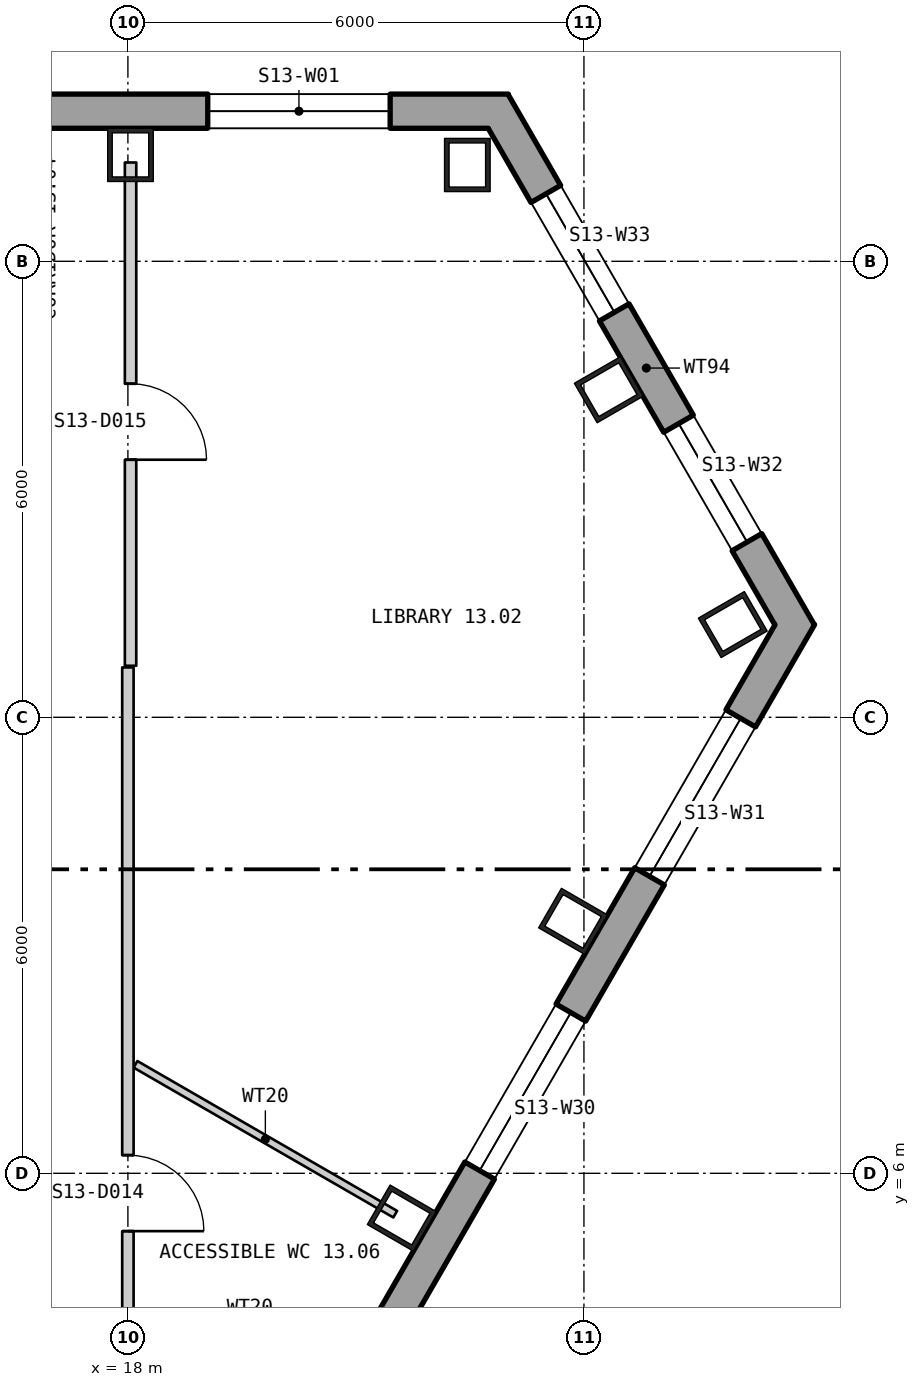
"""IFC4 building model, lengths in metres.
Left out: names, types, materials, properties, quantities, classifications, styles, units other than length and angle.
Written with IfcOpenShell. Run it as: python <this file> out.ifc"""

import sys

from ifc_helpers import new_model, si_unit, direction, frame, frame_2d, origin, origin_2d, place, context, subcontext, project, spatial, polyline, rectangle, hollow_rectangle, outline, extrude, element, fill, save


model = new_model("IFC4")
c1 = context("Model", 3, precision=1e-05, world=origin(), true_north=direction((0.0, 1.0)))
c2 = subcontext(c1, "Body", "Model", "MODEL_VIEW")
j1 = project(units=[si_unit("LENGTHUNIT", "METRE"), si_unit("PLANEANGLEUNIT", "RADIAN")], contexts=[c1])
p1 = place(None, origin())
s1 = spatial("IfcSite", under=j1, at=p1, CompositionType="ELEMENT")
p2 = place(p1, origin())
s2 = spatial("IfcBuilding", under=s1, at=p2, CompositionType="ELEMENT")
p3 = place(p2, frame((0.0, 0.0, 174.9)))
s3 = spatial("IfcBuildingStorey", under=s2, at=p3, CompositionType="ELEMENT", Elevation=174.9)
for number, where, z_axis, x_axis in (
    (1, (22.466, 19.267, 0.0), (0.0, 0.0, 1.0), (-1.0, 0.0, 0.0)),
    (2, (18.034, 19.4, 0.0), (0.0, 0.0, 1.0), (-1.0, 0.0, 0.0)),
    (3, (21.603, 5.411, 0.0), (0.0, 0.0, 1.0), (0.5, 0.866, 0.0)),
    (4, (23.857, 9.315, 0.0), (0.0, 0.0, 1.0), (0.5, 0.866, 0.0)),
    (5, (25.958, 13.22, 0.0), (0.0, 0.0, 1.0), (-0.5, 0.866, 0.0)),
    (6, (24.327, 16.31, 0.0), (0.0, 0.0, 1.0), (-0.5, 0.866, 0.0)),
):
    element("IfcColumn", number, at=place(p3, frame(where, z_axis=z_axis, x_axis=x_axis)), inside=s3, PredefinedType="COLUMN", context=c2, shape_type="SweptSolid", body=[
        extrude(hollow_rectangle(XDim=0.6, YDim=0.7, WallThickness=0.06, at=origin_2d()), origin(), (0.0, 0.0, 1.0), 3.9),
    ])
p4 = place(p3, frame((22.875, 19.975, -0.4), z_axis=(0.0, 0.0, 1.0), x_axis=(-1.0, 0.0, 0.0)))
e7 = element("IfcWall", 7, at=p4, inside=s3, PredefinedType="SOLIDWALL", context=c2, shape_type="SweptSolid", body=[
    extrude(outline(polyline([(-0.13, -0.225), (45.88, -0.225), (45.62, 0.225), (0.13, 0.225), (-0.13, -0.225)])), origin(), (0.0, 0.0, 1.0), 3.9),
])
p5 = place(p4, frame((1.425, 0.0, 1.3)))
e8 = element("IfcOpeningElement", 8, at=p5, cuts=e7, PredefinedType="OPENING", context=c2, shape_type="SweptSolid", body=[
    extrude(rectangle(XDim=2.4, YDim=2.0, at=frame_2d((1.2, 1.0))), frame((0.0, 0.235, 0.0), z_axis=(0.0, -1.0, 0.0), x_axis=(1.0, 0.0, 0.0)), (0.0, 0.0, 1.0), 0.47),
])
p6 = place(p4, frame((10.403, 0.0, 1.3)))
e9 = element("IfcOpeningElement", 9, at=p6, cuts=e7, PredefinedType="OPENING", context=c2, shape_type="SweptSolid", body=[
    extrude(rectangle(XDim=2.4, YDim=2.0, at=frame_2d((1.2, 1.0))), frame((0.0, 0.235, 0.0), z_axis=(0.0, -1.0, 0.0), x_axis=(1.0, 0.0, 0.0)), (0.0, 0.0, 1.0), 0.47),
])
p7 = place(p4, frame((14.912, 0.0, 1.3)))
e10 = element("IfcOpeningElement", 10, at=p7, cuts=e7, PredefinedType="OPENING", context=c2, shape_type="SweptSolid", body=[
    extrude(rectangle(XDim=2.4, YDim=2.0, at=frame_2d((1.2, 1.0))), frame((0.0, 0.235, 0.0), z_axis=(0.0, -1.0, 0.0), x_axis=(1.0, 0.0, 0.0)), (0.0, 0.0, 1.0), 0.47),
])
p8 = place(p4, frame((19.421, 0.0, 1.3)))
e11 = element("IfcOpeningElement", 11, at=p8, cuts=e7, PredefinedType="OPENING", context=c2, shape_type="SweptSolid", body=[
    extrude(rectangle(XDim=2.4, YDim=2.0, at=frame_2d((1.2, 1.0))), frame((0.0, 0.235, 0.0), z_axis=(0.0, -1.0, 0.0), x_axis=(1.0, 0.0, 0.0)), (0.0, 0.0, 1.0), 0.47),
])
p9 = place(p4, frame((23.929, 0.0, 1.3)))
e12 = element("IfcOpeningElement", 12, at=p9, cuts=e7, PredefinedType="OPENING", context=c2, shape_type="SweptSolid", body=[
    extrude(rectangle(XDim=2.4, YDim=2.0, at=frame_2d((1.2, 1.0))), frame((0.0, 0.235, 0.0), z_axis=(0.0, -1.0, 0.0), x_axis=(1.0, 0.0, 0.0)), (0.0, 0.0, 1.0), 0.47),
])
p10 = place(p4, frame((28.438, 0.0, 1.3)))
e13 = element("IfcOpeningElement", 13, at=p10, cuts=e7, PredefinedType="OPENING", context=c2, shape_type="SweptSolid", body=[
    extrude(rectangle(XDim=2.4, YDim=2.0, at=frame_2d((1.2, 1.0))), frame((0.0, 0.235, 0.0), z_axis=(0.0, -1.0, 0.0), x_axis=(1.0, 0.0, 0.0)), (0.0, 0.0, 1.0), 0.47),
])
p11 = place(p4, frame((32.947, 0.0, 1.3)))
e14 = element("IfcOpeningElement", 14, at=p11, cuts=e7, PredefinedType="OPENING", context=c2, shape_type="SweptSolid", body=[
    extrude(rectangle(XDim=2.4, YDim=2.0, at=frame_2d((1.2, 1.0))), frame((0.0, 0.235, 0.0), z_axis=(0.0, -1.0, 0.0), x_axis=(1.0, 0.0, 0.0)), (0.0, 0.0, 1.0), 0.47),
])
p12 = place(p4, frame((37.455, 0.0, 1.3)))
e15 = element("IfcOpeningElement", 15, at=p12, cuts=e7, PredefinedType="OPENING", context=c2, shape_type="SweptSolid", body=[
    extrude(rectangle(XDim=2.4, YDim=2.0, at=frame_2d((1.2, 1.0))), frame((0.0, 0.235, 0.0), z_axis=(0.0, -1.0, 0.0), x_axis=(1.0, 0.0, 0.0)), (0.0, 0.0, 1.0), 0.47),
])
p13 = place(p4, frame((41.925, 0.0, 1.3)))
e16 = element("IfcOpeningElement", 16, at=p13, cuts=e7, PredefinedType="OPENING", context=c2, shape_type="SweptSolid", body=[
    extrude(rectangle(XDim=2.4, YDim=2.0, at=frame_2d((1.2, 1.0))), frame((0.0, 0.235, 0.0), z_axis=(0.0, -1.0, 0.0), x_axis=(1.0, 0.0, 0.0)), (0.0, 0.0, 1.0), 0.47),
])
p14 = place(p3, frame((3.9, -26.401, -0.18), z_axis=(0.0, 0.0, 1.0), x_axis=(0.500000335318, 0.866025210188, 0.0)))
e17 = element("IfcWall", 17, at=p14, inside=s3, PredefinedType="SOLIDWALL", context=c2, shape_type="SweptSolid", body=[
    extrude(outline(polyline([(-0.13, -0.225), (45.88, -0.225), (45.62, 0.225), (0.13, 0.225), (-0.13, -0.225)])), origin(), (0.0, 0.0, 1.0), 3.68),
])
p15 = place(p14, frame((1.425, 0.0, 1.08)))
e18 = element("IfcOpeningElement", 18, at=p15, cuts=e17, PredefinedType="OPENING", context=c2, shape_type="SweptSolid", body=[
    extrude(rectangle(XDim=2.4, YDim=2.0, at=frame_2d((1.2, 1.0))), frame((0.0, 0.235, 0.0), z_axis=(0.0, -1.0, 0.0), x_axis=(1.0, 0.0, 0.0)), (0.0, 0.0, 1.0), 0.47),
])
p16 = place(p14, frame((5.895, 0.0, 1.08)))
e19 = element("IfcOpeningElement", 19, at=p16, cuts=e17, PredefinedType="OPENING", context=c2, shape_type="SweptSolid", body=[
    extrude(rectangle(XDim=2.4, YDim=2.0, at=frame_2d((1.2, 1.0))), frame((0.0, 0.235, 0.0), z_axis=(0.0, -1.0, 0.0), x_axis=(1.0, 0.0, 0.0)), (0.0, 0.0, 1.0), 0.47),
])
p17 = place(p14, frame((10.403, 0.0, 1.08)))
e20 = element("IfcOpeningElement", 20, at=p17, cuts=e17, PredefinedType="OPENING", context=c2, shape_type="SweptSolid", body=[
    extrude(rectangle(XDim=2.4, YDim=2.0, at=frame_2d((1.2, 1.0))), frame((0.0, 0.235, 0.0), z_axis=(0.0, -1.0, 0.0), x_axis=(1.0, 0.0, 0.0)), (0.0, 0.0, 1.0), 0.47),
])
p18 = place(p14, frame((14.912, 0.0, 1.08)))
e21 = element("IfcOpeningElement", 21, at=p18, cuts=e17, PredefinedType="OPENING", context=c2, shape_type="SweptSolid", body=[
    extrude(rectangle(XDim=2.4, YDim=2.0, at=frame_2d((1.2, 1.0))), frame((0.0, 0.235, 0.0), z_axis=(0.0, -1.0, 0.0), x_axis=(1.0, 0.0, 0.0)), (0.0, 0.0, 1.0), 0.47),
])
p19 = place(p14, frame((19.421, 0.0, 1.08)))
e22 = element("IfcOpeningElement", 22, at=p19, cuts=e17, PredefinedType="OPENING", context=c2, shape_type="SweptSolid", body=[
    extrude(rectangle(XDim=2.4, YDim=2.0, at=frame_2d((1.2, 1.0))), frame((0.0, 0.235, 0.0), z_axis=(0.0, -1.0, 0.0), x_axis=(1.0, 0.0, 0.0)), (0.0, 0.0, 1.0), 0.47),
])
p20 = place(p14, frame((23.929, 0.0, 1.08)))
e23 = element("IfcOpeningElement", 23, at=p20, cuts=e17, PredefinedType="OPENING", context=c2, shape_type="SweptSolid", body=[
    extrude(rectangle(XDim=2.4, YDim=2.0, at=frame_2d((1.2, 1.0))), frame((0.0, 0.235, 0.0), z_axis=(0.0, -1.0, 0.0), x_axis=(1.0, 0.0, 0.0)), (0.0, 0.0, 1.0), 0.47),
])
p21 = place(p14, frame((37.455, 0.0, 1.08)))
e24 = element("IfcOpeningElement", 24, at=p21, cuts=e17, PredefinedType="OPENING", context=c2, shape_type="SweptSolid", body=[
    extrude(rectangle(XDim=2.4, YDim=2.0, at=frame_2d((1.2, 1.0))), frame((0.0, 0.235, 0.0), z_axis=(0.0, -1.0, 0.0), x_axis=(1.0, 0.0, 0.0)), (0.0, 0.0, 1.0), 0.47),
])
p22 = place(p14, frame((41.925, 0.0, 1.08)))
e25 = element("IfcOpeningElement", 25, at=p22, cuts=e17, PredefinedType="OPENING", context=c2, shape_type="SweptSolid", body=[
    extrude(rectangle(XDim=2.4, YDim=2.0, at=frame_2d((1.2, 1.0))), frame((0.0, 0.235, 0.0), z_axis=(0.0, -1.0, 0.0), x_axis=(1.0, 0.0, 0.0)), (0.0, 0.0, 1.0), 0.47),
])
p23 = place(p3, frame((26.771, 13.218, -0.4), z_axis=(0.0, 0.0, 1.0), x_axis=(-0.500003961136, 0.86602311681, 0.0)))
e26 = element("IfcWall", 26, at=p23, inside=s3, PredefinedType="SOLIDWALL", context=c2, shape_type="SweptSolid", body=[
    extrude(outline(polyline([(-0.13, -0.225), (7.93, -0.225), (7.67, 0.225), (0.13, 0.225), (-0.13, -0.225)])), origin(), (0.0, 0.0, 1.0), 3.9),
])
p24 = place(p23, frame((1.254, 0.0, 1.3)))
e27 = element("IfcOpeningElement", 27, at=p24, cuts=e26, PredefinedType="OPENING", context=c2, shape_type="SweptSolid", body=[
    extrude(rectangle(XDim=1.8, YDim=2.0, at=frame_2d((0.9, 1.0))), frame((0.0, 0.235, 0.0), z_axis=(0.0, -1.0, 0.0), x_axis=(1.0, 0.0, 0.0)), (0.0, 0.0, 1.0), 0.47),
])
p25 = place(p23, frame((4.746, 0.0, 1.3)))
e28 = element("IfcOpeningElement", 28, at=p25, cuts=e26, PredefinedType="OPENING", context=c2, shape_type="SweptSolid", body=[
    extrude(rectangle(XDim=1.8, YDim=2.0, at=frame_2d((0.9, 1.0))), frame((0.0, 0.235, 0.0), z_axis=(0.0, -1.0, 0.0), x_axis=(1.0, 0.0, 0.0)), (0.0, 0.0, 1.0), 0.47),
])
p26 = place(p3, frame((18.0, 0.125, 0.0), z_axis=(0.0, 0.0, 1.0), x_axis=(0.0, 1.0, 0.0)))
e29 = element("IfcWall", 29, at=p26, inside=s3, PredefinedType="PARTITIONING", context=c2, shape_type="SweptSolid", body=[
    extrude(rectangle(XDim=12.531, YDim=0.15, at=frame_2d((6.266, 0.0))), origin(), (0.0, 0.0, 1.0), 3.7),
])
p27 = place(p26, frame((2.51, 0.0, 0.0)))
e30 = element("IfcOpeningElement", 30, at=p27, cuts=e29, PredefinedType="OPENING", context=c2, shape_type="SweptSolid", body=[
    extrude(rectangle(XDim=1.0, YDim=2.1, at=frame_2d((0.5, 1.05))), frame((0.0, 0.085, 0.0), z_axis=(0.0, -1.0, 0.0), x_axis=(1.0, 0.0, 0.0)), (0.0, 0.0, 1.0), 0.17),
])
p28 = place(p26, frame((5.114, 0.0, 0.0)))
e31 = element("IfcOpeningElement", 31, at=p28, cuts=e29, PredefinedType="OPENING", context=c2, shape_type="SweptSolid", body=[
    extrude(rectangle(XDim=1.0, YDim=2.1, at=frame_2d((0.5, 1.05))), frame((0.0, 0.085, 0.0), z_axis=(0.0, -1.0, 0.0), x_axis=(1.0, 0.0, 0.0)), (0.0, 0.0, 1.0), 0.17),
])
p29 = place(p3, frame((18.035, 12.678, 0.0), z_axis=(0.0, 0.0, 1.0), x_axis=(0.0, 1.0, 0.0)))
e32 = element("IfcWall", 32, at=p29, inside=s3, PredefinedType="PARTITIONING", context=c2, shape_type="SweptSolid", body=[
    extrude(rectangle(XDim=6.622, YDim=0.15, at=frame_2d((3.311, 0.0))), origin(), (0.0, 0.0, 1.0), 3.7),
])
p30 = place(p29, frame((2.711, 0.0, 0.0)))
e33 = element("IfcOpeningElement", 33, at=p30, cuts=e32, PredefinedType="OPENING", context=c2, shape_type="SweptSolid", body=[
    extrude(rectangle(XDim=1.0, YDim=2.1, at=frame_2d((0.5, 1.05))), frame((0.0, 0.085, 0.0), z_axis=(0.0, -1.0, 0.0), x_axis=(1.0, 0.0, 0.0)), (0.0, 0.0, 1.0), 0.17),
])
p31 = place(p3, frame((18.1, 7.434, 0.0), z_axis=(0.0, 0.0, 1.0), x_axis=(0.866113839764, -0.499846793097, 0.0)))
e34 = element("IfcWall", 34, at=p31, inside=s3, PredefinedType="PARTITIONING", context=c2, shape_type="SweptSolid", body=[
    extrude(rectangle(XDim=3.945, YDim=0.1, at=frame_2d((1.973, 0.0))), origin(), (0.0, 0.0, 1.0), 3.7),
])
p32 = place(p5, origin())
e35 = element("IfcWindow", 35, at=p32, inside=s3, PartitioningType="SINGLE_PANEL", PredefinedType="WINDOW", context=c2, shape_type="SweptSolid", body=[
    extrude(rectangle(XDim=2.4, YDim=2.0, at=frame_2d((1.2, 1.0))), frame((0.0, 0.105, 0.0), z_axis=(0.0, -1.0, 0.0), x_axis=(1.0, 0.0, 0.0)), (0.0, 0.0, 1.0), 0.06),
])
fill(e8, e35)
p33 = place(p21, origin())
e36 = element("IfcWindow", 36, at=p33, inside=s3, PartitioningType="SINGLE_PANEL", PredefinedType="WINDOW", context=c2, shape_type="SweptSolid", body=[
    extrude(rectangle(XDim=2.4, YDim=2.0, at=frame_2d((1.2, 1.0))), frame((0.0, 0.105, 0.0), z_axis=(0.0, -1.0, 0.0), x_axis=(1.0, 0.0, 0.0)), (0.0, 0.0, 1.0), 0.06),
])
fill(e24, e36)
p34 = place(p22, origin())
e37 = element("IfcWindow", 37, at=p34, inside=s3, PartitioningType="SINGLE_PANEL", PredefinedType="WINDOW", context=c2, shape_type="SweptSolid", body=[
    extrude(rectangle(XDim=2.4, YDim=2.0, at=frame_2d((1.2, 1.0))), frame((0.0, 0.105, 0.0), z_axis=(0.0, -1.0, 0.0), x_axis=(1.0, 0.0, 0.0)), (0.0, 0.0, 1.0), 0.06),
])
fill(e25, e37)
p35 = place(p24, origin())
e38 = element("IfcWindow", 38, at=p35, inside=s3, PartitioningType="SINGLE_PANEL", PredefinedType="WINDOW", context=c2, shape_type="SweptSolid", body=[
    extrude(rectangle(XDim=1.8, YDim=2.0, at=frame_2d((0.9, 1.0))), frame((0.0, 0.105, 0.0), z_axis=(0.0, -1.0, 0.0), x_axis=(1.0, 0.0, 0.0)), (0.0, 0.0, 1.0), 0.06),
])
fill(e27, e38)
p36 = place(p25, origin())
e39 = element("IfcWindow", 39, at=p36, inside=s3, PartitioningType="SINGLE_PANEL", PredefinedType="WINDOW", context=c2, shape_type="SweptSolid", body=[
    extrude(rectangle(XDim=1.8, YDim=2.0, at=frame_2d((0.9, 1.0))), frame((0.0, 0.105, 0.0), z_axis=(0.0, -1.0, 0.0), x_axis=(1.0, 0.0, 0.0)), (0.0, 0.0, 1.0), 0.06),
])
fill(e28, e39)
p37 = place(p28, origin())
e40 = element("IfcDoor", 40, at=p37, inside=s3, OperationType="SINGLE_SWING_LEFT", PredefinedType="DOOR", context=c2, shape_type="SweptSolid", body=[
    extrude(rectangle(XDim=1.0, YDim=2.1, at=frame_2d((0.5, 1.05))), frame((0.0, 0.025, 0.0), z_axis=(0.0, -1.0, 0.0), x_axis=(1.0, 0.0, 0.0)), (0.0, 0.0, 1.0), 0.05),
])
fill(e31, e40)
p38 = place(p30, origin())
e41 = element("IfcDoor", 41, at=p38, inside=s3, OperationType="SINGLE_SWING_LEFT", PredefinedType="DOOR", context=c2, shape_type="SweptSolid", body=[
    extrude(rectangle(XDim=1.0, YDim=2.1, at=frame_2d((0.5, 1.05))), frame((0.0, 0.025, 0.0), z_axis=(0.0, -1.0, 0.0), x_axis=(1.0, 0.0, 0.0)), (0.0, 0.0, 1.0), 0.05),
])
fill(e33, e41)
save(model, sys.argv[1])
